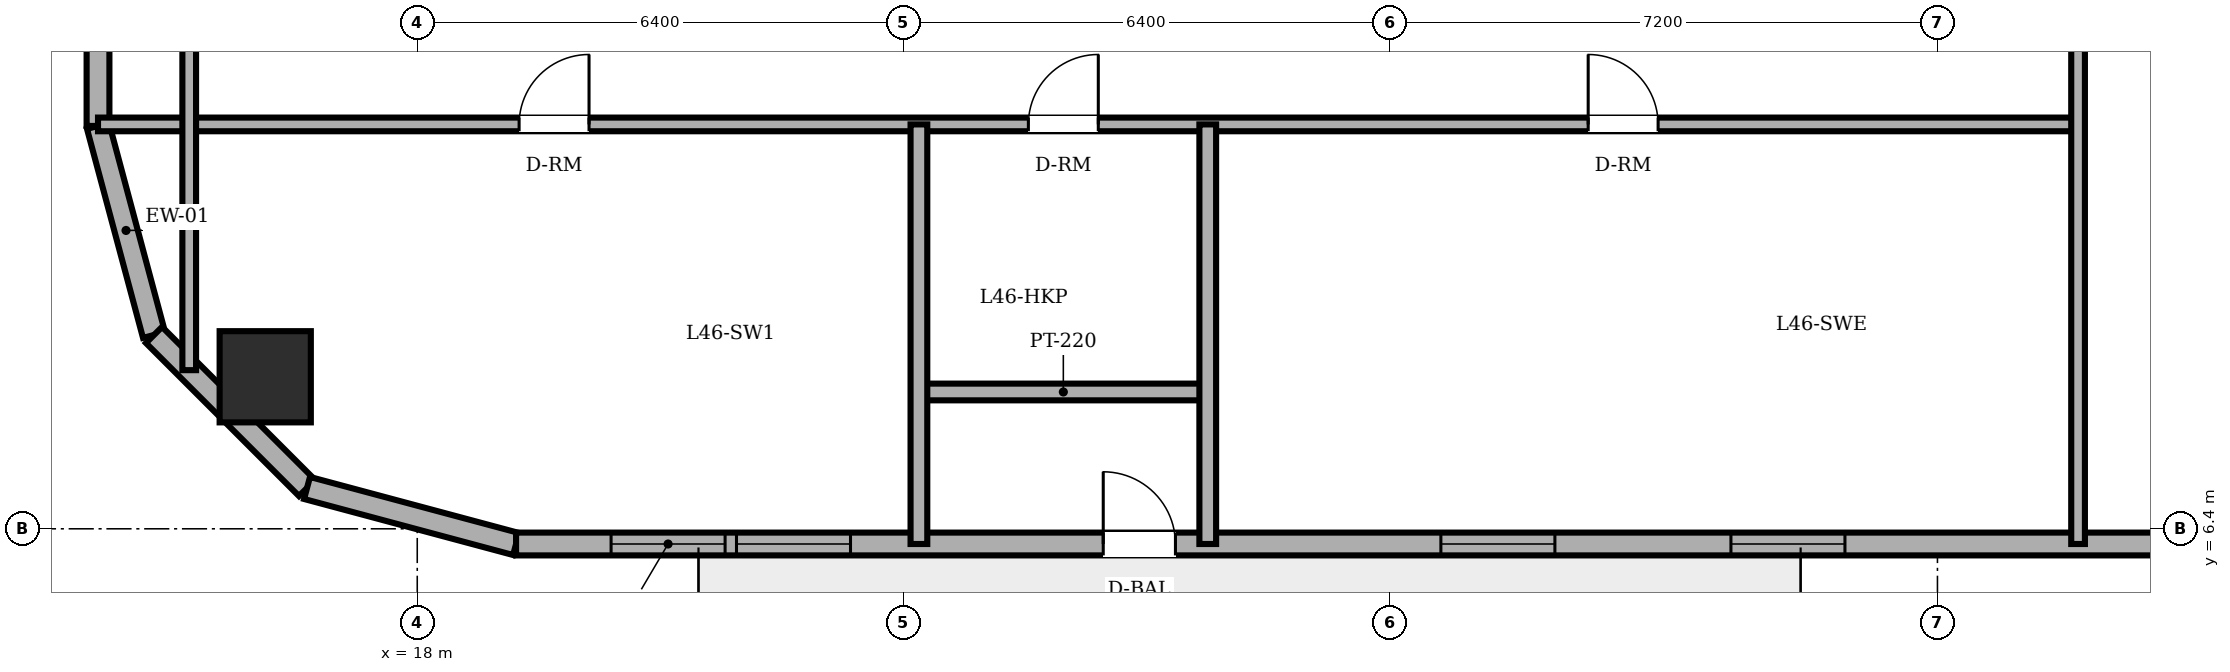
"""IFC4 building model, lengths in metres.
Left out: names, types, materials, properties, quantities, classifications, styles, units other than length and angle.
Written with IfcOpenShell. Run it as: python <this file> out.ifc"""

import sys

from ifc_helpers import new_model, si_unit, direction, frame, frame_2d, origin, origin_2d, place, context, subcontext, project, spatial, rectangle, circle, extrude, element, fill, save


model = new_model("IFC4")
c1 = context("Model", 3, precision=1e-05, world=origin(), true_north=direction((0.0, 1.0)))
c2 = subcontext(c1, "Body", "Model", "MODEL_VIEW")
j1 = project(units=[si_unit("LENGTHUNIT", "METRE"), si_unit("PLANEANGLEUNIT", "RADIAN")], contexts=[c1])
p1 = place(None, origin())
s1 = spatial("IfcSite", under=j1, at=p1, CompositionType="ELEMENT")
p2 = place(p1, origin())
s2 = spatial("IfcBuilding", under=s1, at=p2, CompositionType="ELEMENT")
p3 = place(p2, frame((0.0, 0.0, 176.2)))
s3 = spatial("IfcBuildingStorey", under=s2, at=p3, CompositionType="ELEMENT", Elevation=176.2)
p4 = place(p3, frame((16.0, 8.4, 0.0), z_axis=(0.0, 0.0, 1.0), x_axis=(1.0, 0.0, 0.0)))
e1 = element("IfcColumn", 1, at=p4, inside=s3, PredefinedType="COLUMN", context=c2, shape_type="SweptSolid", body=[
    extrude(circle(Radius=0.6, at=origin_2d()), origin(), (0.0, 0.0, 1.0), 3.6),
])
p5 = place(p3, frame((13.8, 11.7, 0.0), z_axis=(0.0, 0.0, 1.0), x_axis=(0.258884674387, -0.965908238586, 0.0)))
e2 = element("IfcWall", 2, at=p5, inside=s3, PredefinedType="SOLIDWALL", context=c2, shape_type="SweptSolid", body=[
    extrude(rectangle(XDim=2.847, YDim=0.3, at=frame_2d((1.424, 0.0))), origin(), (0.0, 0.0, 1.0), 3.4),
])
p6 = place(p3, frame((14.537, 8.95, 0.0), z_axis=(0.0, 0.0, 1.0), x_axis=(0.707106781187, -0.707106781187, 0.0)))
e3 = element("IfcWall", 3, at=p6, inside=s3, PredefinedType="SOLIDWALL", context=c2, shape_type="SweptSolid", body=[
    extrude(rectangle(XDim=2.847, YDim=0.3, at=frame_2d((1.423, 0.0))), origin(), (0.0, 0.0, 1.0), 3.4),
])
p7 = place(p3, frame((16.55, 6.937, 0.0), z_axis=(0.0, 0.0, 1.0), x_axis=(0.965908238586, -0.258884674387, 0.0)))
e4 = element("IfcWall", 4, at=p7, inside=s3, PredefinedType="SOLIDWALL", context=c2, shape_type="SweptSolid", body=[
    extrude(rectangle(XDim=2.847, YDim=0.3, at=frame_2d((1.424, 0.0))), origin(), (0.0, 0.0, 1.0), 3.4),
])
p8 = place(p3, frame((19.3, 6.2, 0.0), z_axis=(0.0, 0.0, 1.0), x_axis=(1.0, 0.0, 0.0)))
e5 = element("IfcWall", 5, at=p8, inside=s3, PredefinedType="SOLIDWALL", context=c2, shape_type="SweptSolid", body=[
    extrude(rectangle(XDim=30.282, YDim=0.3, at=frame_2d((15.141, 0.0))), origin(), (0.0, 0.0, 1.0), 3.4),
])
p9 = place(p8, frame((7.725, 0.0, 0.0)))
e6 = element("IfcOpeningElement", 6, at=p9, cuts=e5, PredefinedType="OPENING", context=c2, shape_type="SweptSolid", body=[
    extrude(rectangle(XDim=0.95, YDim=2.2, at=frame_2d((0.475, 1.1))), frame((0.0, 0.16, 0.0), z_axis=(0.0, -1.0, 0.0), x_axis=(1.0, 0.0, 0.0)), (0.0, 0.0, 1.0), 0.32),
])
p10 = place(p8, frame((1.25, 0.0, 0.85)))
e7 = element("IfcOpeningElement", 7, at=p10, cuts=e5, PredefinedType="OPENING", context=c2, shape_type="SweptSolid", body=[
    extrude(rectangle(XDim=1.5, YDim=1.55, at=frame_2d((0.75, 0.775))), frame((0.0, 0.16, 0.0), z_axis=(0.0, -1.0, 0.0), x_axis=(1.0, 0.0, 0.0)), (0.0, 0.0, 1.0), 0.32),
])
p11 = place(p8, frame((2.9, 0.0, 0.85)))
e8 = element("IfcOpeningElement", 8, at=p11, cuts=e5, PredefinedType="OPENING", context=c2, shape_type="SweptSolid", body=[
    extrude(rectangle(XDim=1.5, YDim=1.55, at=frame_2d((0.75, 0.775))), frame((0.0, 0.16, 0.0), z_axis=(0.0, -1.0, 0.0), x_axis=(1.0, 0.0, 0.0)), (0.0, 0.0, 1.0), 0.32),
])
p12 = place(p8, frame((12.167, 0.0, 0.85)))
e9 = element("IfcOpeningElement", 9, at=p12, cuts=e5, PredefinedType="OPENING", context=c2, shape_type="SweptSolid", body=[
    extrude(rectangle(XDim=1.5, YDim=1.55, at=frame_2d((0.75, 0.775))), frame((0.0, 0.16, 0.0), z_axis=(0.0, -1.0, 0.0), x_axis=(1.0, 0.0, 0.0)), (0.0, 0.0, 1.0), 0.32),
])
p13 = place(p8, frame((15.983, 0.0, 0.85)))
e10 = element("IfcOpeningElement", 10, at=p13, cuts=e5, PredefinedType="OPENING", context=c2, shape_type="SweptSolid", body=[
    extrude(rectangle(XDim=1.5, YDim=1.55, at=frame_2d((0.75, 0.775))), frame((0.0, 0.16, 0.0), z_axis=(0.0, -1.0, 0.0), x_axis=(1.0, 0.0, 0.0)), (0.0, 0.0, 1.0), 0.32),
])
p14 = place(p8, frame((21.6, 0.0, 0.85)))
e11 = element("IfcOpeningElement", 11, at=p14, cuts=e5, PredefinedType="OPENING", context=c2, shape_type="SweptSolid", body=[
    extrude(rectangle(XDim=1.5, YDim=1.55, at=frame_2d((0.75, 0.775))), frame((0.0, 0.16, 0.0), z_axis=(0.0, -1.0, 0.0), x_axis=(1.0, 0.0, 0.0)), (0.0, 0.0, 1.0), 0.32),
])
p15 = place(p8, frame((25.327, 0.0, 0.85)))
e12 = element("IfcOpeningElement", 12, at=p15, cuts=e5, PredefinedType="OPENING", context=c2, shape_type="SweptSolid", body=[
    extrude(rectangle(XDim=1.5, YDim=1.55, at=frame_2d((0.75, 0.775))), frame((0.0, 0.16, 0.0), z_axis=(0.0, -1.0, 0.0), x_axis=(1.0, 0.0, 0.0)), (0.0, 0.0, 1.0), 0.32),
])
p16 = place(p8, frame((27.255, 0.0, 0.85)))
e13 = element("IfcOpeningElement", 13, at=p16, cuts=e5, PredefinedType="OPENING", context=c2, shape_type="SweptSolid", body=[
    extrude(rectangle(XDim=1.5, YDim=1.55, at=frame_2d((0.75, 0.775))), frame((0.0, 0.16, 0.0), z_axis=(0.0, -1.0, 0.0), x_axis=(1.0, 0.0, 0.0)), (0.0, 0.0, 1.0), 0.32),
])
p17 = place(p3, frame((13.8, 36.3, 0.0), z_axis=(0.0, 0.0, 1.0), x_axis=(0.0, -1.0, 0.0)))
e14 = element("IfcWall", 14, at=p17, inside=s3, PredefinedType="SOLIDWALL", context=c2, shape_type="SweptSolid", body=[
    extrude(rectangle(XDim=24.6, YDim=0.3, at=frame_2d((12.3, 0.0))), origin(), (0.0, 0.0, 1.0), 3.4),
])
p18 = place(p17, frame((5.003, 0.0, 0.85)))
e15 = element("IfcOpeningElement", 15, at=p18, cuts=e14, PredefinedType="OPENING", context=c2, shape_type="SweptSolid", body=[
    extrude(rectangle(XDim=1.5, YDim=1.55, at=frame_2d((0.75, 0.775))), frame((0.0, 0.16, 0.0), z_axis=(0.0, -1.0, 0.0), x_axis=(1.0, 0.0, 0.0)), (0.0, 0.0, 1.0), 0.32),
])
p19 = place(p17, frame((8.277, 0.0, 0.85)))
e16 = element("IfcOpeningElement", 16, at=p19, cuts=e14, PredefinedType="OPENING", context=c2, shape_type="SweptSolid", body=[
    extrude(rectangle(XDim=1.5, YDim=1.55, at=frame_2d((0.75, 0.775))), frame((0.0, 0.16, 0.0), z_axis=(0.0, -1.0, 0.0), x_axis=(1.0, 0.0, 0.0)), (0.0, 0.0, 1.0), 0.32),
])
p20 = place(p17, frame((14.823, 0.0, 0.85)))
e17 = element("IfcOpeningElement", 17, at=p20, cuts=e14, PredefinedType="OPENING", context=c2, shape_type="SweptSolid", body=[
    extrude(rectangle(XDim=1.5, YDim=1.55, at=frame_2d((0.75, 0.775))), frame((0.0, 0.16, 0.0), z_axis=(0.0, -1.0, 0.0), x_axis=(1.0, 0.0, 0.0)), (0.0, 0.0, 1.0), 0.32),
])
p21 = place(p17, frame((18.097, 0.0, 0.85)))
e18 = element("IfcOpeningElement", 18, at=p21, cuts=e14, PredefinedType="OPENING", context=c2, shape_type="SweptSolid", body=[
    extrude(rectangle(XDim=1.5, YDim=1.55, at=frame_2d((0.75, 0.775))), frame((0.0, 0.16, 0.0), z_axis=(0.0, -1.0, 0.0), x_axis=(1.0, 0.0, 0.0)), (0.0, 0.0, 1.0), 0.32),
])
p22 = place(p3, frame((24.6, 8.2, 0.0), z_axis=(0.0, 0.0, 1.0), x_axis=(1.0, 0.0, 0.0)))
e19 = element("IfcWall", 19, at=p22, inside=s3, PredefinedType="PARTITIONING", context=c2, shape_type="SweptSolid", body=[
    extrude(rectangle(XDim=3.8, YDim=0.22, at=frame_2d((1.9, 0.0))), origin(), (0.0, 0.0, 1.0), 2.882),
])
p23 = place(p3, frame((13.8, 11.72, 0.0), z_axis=(0.0, 0.0, 1.0), x_axis=(1.0, 0.0, 0.0)))
e20 = element("IfcWall", 20, at=p23, inside=s3, PredefinedType="PARTITIONING", context=c2, shape_type="SweptSolid", body=[
    extrude(rectangle(XDim=26.05, YDim=0.18, at=frame_2d((13.025, 0.0))), origin(), (0.0, 0.0, 1.0), 3.4),
])
p24 = place(p23, frame((12.24, 0.0, 0.0)))
e21 = element("IfcOpeningElement", 21, at=p24, cuts=e20, PredefinedType="OPENING", context=c2, shape_type="SweptSolid", body=[
    extrude(rectangle(XDim=0.92, YDim=2.1, at=frame_2d((0.46, 1.05))), frame((0.0, 0.1, 0.0), z_axis=(0.0, -1.0, 0.0), x_axis=(1.0, 0.0, 0.0)), (0.0, 0.0, 1.0), 0.2),
])
p25 = place(p23, frame((5.54, 0.0, 0.0)))
e22 = element("IfcOpeningElement", 22, at=p25, cuts=e20, PredefinedType="OPENING", context=c2, shape_type="SweptSolid", body=[
    extrude(rectangle(XDim=0.92, YDim=2.1, at=frame_2d((0.46, 1.05))), frame((0.0, 0.1, 0.0), z_axis=(0.0, -1.0, 0.0), x_axis=(1.0, 0.0, 0.0)), (0.0, 0.0, 1.0), 0.2),
])
p26 = place(p23, frame((19.605, 0.0, 0.0)))
e23 = element("IfcOpeningElement", 23, at=p26, cuts=e20, PredefinedType="OPENING", context=c2, shape_type="SweptSolid", body=[
    extrude(rectangle(XDim=0.92, YDim=2.1, at=frame_2d((0.46, 1.05))), frame((0.0, 0.1, 0.0), z_axis=(0.0, -1.0, 0.0), x_axis=(1.0, 0.0, 0.0)), (0.0, 0.0, 1.0), 0.2),
])
p27 = place(p3, frame((15.0, 8.487, 0.0), z_axis=(0.0, 0.0, 1.0), x_axis=(0.0, 1.0, 0.0)))
e24 = element("IfcWall", 24, at=p27, inside=s3, PredefinedType="PARTITIONING", context=c2, shape_type="SweptSolid", body=[
    extrude(rectangle(XDim=5.693, YDim=0.18, at=frame_2d((2.846, 0.0))), origin(), (0.0, 0.0, 1.0), 3.4),
])
for number, where, z_axis, x_axis in (
    (25, (24.6, 6.2, 0.0), (0.0, 0.0, 1.0), (0.0, 1.0, 0.0)),
    (26, (28.4, 6.2, 0.0), (0.0, 0.0, 1.0), (0.0, 1.0, 0.0)),
):
    element("IfcWall", number, at=place(p3, frame(where, z_axis=z_axis, x_axis=x_axis)), inside=s3, PredefinedType="PARTITIONING", context=c2, shape_type="SweptSolid", body=[
        extrude(rectangle(XDim=5.52, YDim=0.22, at=frame_2d((2.76, 0.0))), origin(), (0.0, 0.0, 1.0), 3.4),
    ])
p28 = place(p3, frame((39.85, 6.2, 0.0), z_axis=(0.0, 0.0, 1.0), x_axis=(0.0, 1.0, 0.0)))
e27 = element("IfcWall", 27, at=p28, inside=s3, PredefinedType="PARTITIONING", context=c2, shape_type="SweptSolid", body=[
    extrude(rectangle(XDim=16.62, YDim=0.18, at=frame_2d((8.31, 0.0))), origin(), (0.0, 0.0, 1.0), 3.4),
])
p29 = place(p28, frame((10.35, 0.0, 0.0)))
e28 = element("IfcOpeningElement", 28, at=p29, cuts=e27, PredefinedType="OPENING", context=c2, shape_type="SweptSolid", body=[
    extrude(rectangle(XDim=0.92, YDim=2.1, at=frame_2d((0.46, 1.05))), frame((0.0, 0.1, 0.0), z_axis=(0.0, -1.0, 0.0), x_axis=(1.0, 0.0, 0.0)), (0.0, 0.0, 1.0), 0.2),
])
p30 = place(p9, origin())
e29 = element("IfcDoor", 29, at=p30, inside=s3, OperationType="SINGLE_SWING_LEFT", PredefinedType="DOOR", context=c2, shape_type="SweptSolid", body=[
    extrude(rectangle(XDim=0.95, YDim=2.2, at=frame_2d((0.475, 1.1))), frame((0.0, 0.025, 0.0), z_axis=(0.0, -1.0, 0.0), x_axis=(1.0, 0.0, 0.0)), (0.0, 0.0, 1.0), 0.05),
])
fill(e6, e29)
p31 = place(p10, origin())
e30 = element("IfcWindow", 30, at=p31, inside=s3, PartitioningType="DOUBLE_PANEL_VERTICAL", PredefinedType="WINDOW", context=c2, shape_type="SweptSolid", body=[
    extrude(rectangle(XDim=1.5, YDim=1.55, at=frame_2d((0.75, 0.775))), frame((0.0, 0.03, 0.0), z_axis=(0.0, -1.0, 0.0), x_axis=(1.0, 0.0, 0.0)), (0.0, 0.0, 1.0), 0.06),
])
fill(e7, e30)
p32 = place(p11, origin())
e31 = element("IfcWindow", 31, at=p32, inside=s3, PartitioningType="DOUBLE_PANEL_VERTICAL", PredefinedType="WINDOW", context=c2, shape_type="SweptSolid", body=[
    extrude(rectangle(XDim=1.5, YDim=1.55, at=frame_2d((0.75, 0.775))), frame((0.0, 0.03, 0.0), z_axis=(0.0, -1.0, 0.0), x_axis=(1.0, 0.0, 0.0)), (0.0, 0.0, 1.0), 0.06),
])
fill(e8, e31)
p33 = place(p12, origin())
e32 = element("IfcWindow", 32, at=p33, inside=s3, PartitioningType="DOUBLE_PANEL_VERTICAL", PredefinedType="WINDOW", context=c2, shape_type="SweptSolid", body=[
    extrude(rectangle(XDim=1.5, YDim=1.55, at=frame_2d((0.75, 0.775))), frame((0.0, 0.03, 0.0), z_axis=(0.0, -1.0, 0.0), x_axis=(1.0, 0.0, 0.0)), (0.0, 0.0, 1.0), 0.06),
])
fill(e9, e32)
p34 = place(p13, origin())
e33 = element("IfcWindow", 33, at=p34, inside=s3, PartitioningType="DOUBLE_PANEL_VERTICAL", PredefinedType="WINDOW", context=c2, shape_type="SweptSolid", body=[
    extrude(rectangle(XDim=1.5, YDim=1.55, at=frame_2d((0.75, 0.775))), frame((0.0, 0.03, 0.0), z_axis=(0.0, -1.0, 0.0), x_axis=(1.0, 0.0, 0.0)), (0.0, 0.0, 1.0), 0.06),
])
fill(e10, e33)
p35 = place(p24, origin())
e34 = element("IfcDoor", 34, at=p35, inside=s3, OperationType="SINGLE_SWING_RIGHT", PredefinedType="DOOR", context=c2, shape_type="SweptSolid", body=[
    extrude(rectangle(XDim=0.92, YDim=2.1, at=frame_2d((0.46, 1.05))), frame((0.0, 0.025, 0.0), z_axis=(0.0, -1.0, 0.0), x_axis=(1.0, 0.0, 0.0)), (0.0, 0.0, 1.0), 0.05),
])
fill(e21, e34)
p36 = place(p25, origin())
e35 = element("IfcDoor", 35, at=p36, inside=s3, OperationType="SINGLE_SWING_RIGHT", PredefinedType="DOOR", context=c2, shape_type="SweptSolid", body=[
    extrude(rectangle(XDim=0.92, YDim=2.1, at=frame_2d((0.46, 1.05))), frame((0.0, 0.025, 0.0), z_axis=(0.0, -1.0, 0.0), x_axis=(1.0, 0.0, 0.0)), (0.0, 0.0, 1.0), 0.05),
])
fill(e22, e35)
p37 = place(p26, origin())
e36 = element("IfcDoor", 36, at=p37, inside=s3, OperationType="SINGLE_SWING_LEFT", PredefinedType="DOOR", context=c2, shape_type="SweptSolid", body=[
    extrude(rectangle(XDim=0.92, YDim=2.1, at=frame_2d((0.46, 1.05))), frame((0.0, 0.025, 0.0), z_axis=(0.0, -1.0, 0.0), x_axis=(1.0, 0.0, 0.0)), (0.0, 0.0, 1.0), 0.05),
])
fill(e23, e36)
save(model, sys.argv[1])
